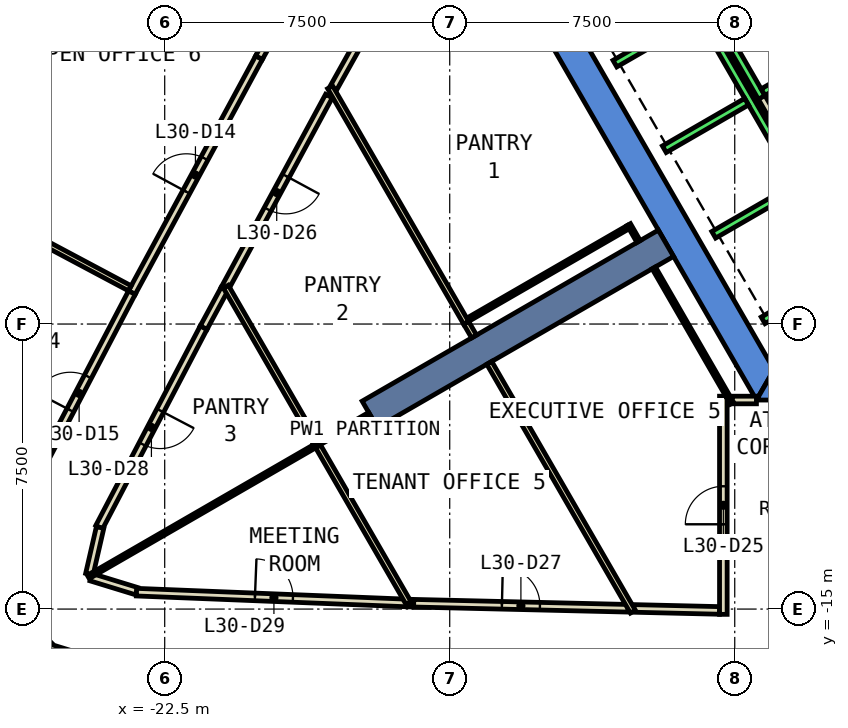
"""IFC4 building model, lengths in metres.
Left out: names, types, materials, properties, quantities, classifications, styles, units other than length and angle.
Written with IfcOpenShell. Run it as: python <this file> out.ifc"""

import sys

from ifc_helpers import new_model, si_unit, direction, frame, frame_2d, origin, place, context, subcontext, project, spatial, polyline, rectangle, outline, extrude, element, fill, save


model = new_model("IFC4")
c1 = context("Model", 3, precision=1e-05, world=origin(), true_north=direction((0.0, 1.0)))
c2 = subcontext(c1, "Body", "Model", "MODEL_VIEW")
j1 = project(units=[si_unit("LENGTHUNIT", "METRE"), si_unit("PLANEANGLEUNIT", "RADIAN")], contexts=[c1])
p1 = place(None, origin())
s1 = spatial("IfcSite", under=j1, at=p1, CompositionType="ELEMENT")
p2 = place(p1, origin())
s2 = spatial("IfcBuilding", under=s1, at=p2, CompositionType="ELEMENT")
p3 = place(p2, frame((0.0, 0.0, 138.2)))
s3 = spatial("IfcBuildingStorey", under=s2, at=p3, CompositionType="ELEMENT", Elevation=138.2)
p4 = place(p3, frame((0.0, 0.0, -0.6)))
e1 = element("IfcWall", 1, at=p4, inside=s3, PredefinedType="SHEAR", context=c2, shape_type="SweptSolid", body=[
    extrude(outline(polyline([(-13.856, 2.5), (-6.928, -9.5), (-6.466, -8.7), (-12.933, 2.5), (-13.856, 2.5)])), origin(), (0.0, 0.0, 1.0), 4.4),
])
p5 = place(p3, frame((0.0, 0.0, -0.6)))
e2 = element("IfcWall", 2, at=p5, inside=s3, PredefinedType="SHEAR", context=c2, shape_type="SweptSolid", body=[
    extrude(outline(polyline([(3.75, -9.5), (3.75, -8.7), (-6.466, -8.7), (-6.928, -9.5), (3.75, -9.5)])), origin(), (0.0, 0.0, 1.0), 4.4),
])
p6 = place(p3, frame((-9.31, -5.375, -0.6), z_axis=(0.0, 0.0, 1.0), x_axis=(-0.866017533419, -0.500013631625, 0.0)))
e3 = element("IfcWall", 3, at=p6, inside=s3, PredefinedType="SHEAR", context=c2, shape_type="SweptSolid", body=[
    extrude(rectangle(XDim=9.0, YDim=0.8, at=frame_2d((4.5, 0.0))), origin(), (0.0, 0.0, 1.0), 4.4),
])
p7 = place(p3, frame((-14.955, 4.264, 0.0), z_axis=(0.0, 0.0, 1.0), x_axis=(-0.4879770011, -0.872856486713, 0.0)))
e4 = element("IfcWall", 4, at=p7, inside=s3, PredefinedType="PARTITIONING", context=c2, shape_type="SweptSolid", body=[
    extrude(rectangle(XDim=6.363, YDim=0.2, at=frame_2d((3.182, 0.0))), origin(), (0.0, 0.0, 1.0), 3.8),
])
p8 = place(p7, frame((2.681, 0.0, 0.0)))
e5 = element("IfcOpeningElement", 5, at=p8, cuts=e4, PredefinedType="OPENING", context=c2, shape_type="SweptSolid", body=[
    extrude(rectangle(XDim=1.0, YDim=2.1, at=frame_2d((0.5, 1.05))), frame((0.0, 0.11, 0.0), z_axis=(0.0, -1.0, 0.0), x_axis=(1.0, 0.0, 0.0)), (0.0, 0.0, 1.0), 0.22),
])
p9 = place(p3, frame((-10.155, -14.983, 0.0), z_axis=(0.0, 0.0, 1.0), x_axis=(0.999724165956, -0.023485995887, 0.0)))
e6 = element("IfcWall", 6, at=p9, inside=s3, PredefinedType="PARTITIONING", context=c2, shape_type="SweptSolid", body=[
    extrude(rectangle(XDim=2.256, YDim=0.2, at=frame_2d((1.128, 0.0))), origin(), (0.0, 0.0, 1.0), 3.8),
])
p10 = place(p3, frame((-18.178, -1.501, 0.0), z_axis=(0.0, 0.0, 1.0), x_axis=(-0.475923642768, -0.879486603795, 0.0)))
e7 = element("IfcWall", 7, at=p10, inside=s3, PredefinedType="PARTITIONING", context=c2, shape_type="SweptSolid", body=[
    extrude(rectangle(XDim=5.776, YDim=0.2, at=frame_2d((2.888, 0.0))), origin(), (0.0, 0.0, 1.0), 3.8),
])
p11 = place(p10, frame((2.388, 0.0, 0.0)))
e8 = element("IfcOpeningElement", 8, at=p11, cuts=e7, PredefinedType="OPENING", context=c2, shape_type="SweptSolid", body=[
    extrude(rectangle(XDim=1.0, YDim=2.1, at=frame_2d((0.5, 1.05))), frame((0.0, 0.11, 0.0), z_axis=(0.0, -1.0, 0.0), x_axis=(1.0, 0.0, 0.0)), (0.0, 0.0, 1.0), 0.22),
])
p12 = place(p3, frame((-15.948, -14.846, 0.0), z_axis=(0.0, 0.0, 1.0), x_axis=(0.999722136341, -0.023572231734, 0.0)))
e9 = element("IfcWall", 9, at=p12, inside=s3, PredefinedType="PARTITIONING", context=c2, shape_type="SweptSolid", body=[
    extrude(rectangle(XDim=5.645, YDim=0.2, at=frame_2d((2.822, 0.0))), origin(), (0.0, 0.0, 1.0), 3.8),
])
p13 = place(p12, frame((2.322, 0.0, 0.0)))
e10 = element("IfcOpeningElement", 10, at=p13, cuts=e9, PredefinedType="OPENING", context=c2, shape_type="SweptSolid", body=[
    extrude(rectangle(XDim=1.0, YDim=2.1, at=frame_2d((0.5, 1.05))), frame((0.0, 0.11, 0.0), z_axis=(0.0, -1.0, 0.0), x_axis=(1.0, 0.0, 0.0)), (0.0, 0.0, 1.0), 0.22),
])
p14 = place(p3, frame((-21.475, -7.594, 0.0), z_axis=(0.0, 0.0, 1.0), x_axis=(-0.463809970306, -0.885934710599, 0.0)))
e11 = element("IfcWall", 11, at=p14, inside=s3, PredefinedType="PARTITIONING", context=c2, shape_type="SweptSolid", body=[
    extrude(rectangle(XDim=5.927, YDim=0.2, at=frame_2d((2.963, 0.0))), origin(), (0.0, 0.0, 1.0), 3.8),
])
p15 = place(p14, frame((2.464, 0.0, 0.0)))
e12 = element("IfcOpeningElement", 12, at=p15, cuts=e11, PredefinedType="OPENING", context=c2, shape_type="SweptSolid", body=[
    extrude(rectangle(XDim=1.0, YDim=2.1, at=frame_2d((0.5, 1.05))), frame((0.0, 0.11, 0.0), z_axis=(0.0, -1.0, 0.0), x_axis=(1.0, 0.0, 0.0)), (0.0, 0.0, 1.0), 0.22),
])
p16 = place(p3, frame((-24.2, -12.854, 0.0), z_axis=(0.0, 0.0, 1.0), x_axis=(-0.223967203961, -0.974596681479, 0.0)))
e13 = element("IfcWall", 13, at=p16, inside=s3, PredefinedType="PARTITIONING", context=c2, shape_type="SweptSolid", body=[
    extrude(rectangle(XDim=1.259, YDim=0.2, at=frame_2d((0.629, 0.0))), origin(), (0.0, 0.0, 1.0), 3.8),
])
p17 = place(p3, frame((-20.927, -6.581, 0.0), z_axis=(0.0, 0.0, 1.0), x_axis=(-0.475893856394, -0.879502721682, 0.0)))
e14 = element("IfcWall", 14, at=p17, inside=s3, PredefinedType="PARTITIONING", context=c2, shape_type="SweptSolid", body=[
    extrude(rectangle(XDim=1.152, YDim=0.2, at=frame_2d((0.576, 0.0))), origin(), (0.0, 0.0, 1.0), 3.8),
])
p18 = place(p3, frame((-24.435, -14.162, 0.0), z_axis=(0.0, 0.0, 1.0), x_axis=(0.956086269468, -0.293085389152, 0.0)))
e15 = element("IfcWall", 15, at=p18, inside=s3, PredefinedType="PARTITIONING", context=c2, shape_type="SweptSolid", body=[
    extrude(rectangle(XDim=1.252, YDim=0.2, at=frame_2d((0.626, 0.0))), origin(), (0.0, 0.0, 1.0), 3.8),
])
p19 = place(p3, frame((-23.242, -14.555, 0.0), z_axis=(0.0, 0.0, 1.0), x_axis=(0.999202143743, -0.039938401802, 0.0)))
e16 = element("IfcWall", 16, at=p19, inside=s3, PredefinedType="PARTITIONING", context=c2, shape_type="SweptSolid", body=[
    extrude(rectangle(XDim=7.238, YDim=0.2, at=frame_2d((3.619, 0.0))), origin(), (0.0, 0.0, 1.0), 3.8),
])
p20 = place(p19, frame((3.119, 0.0, 0.0)))
e17 = element("IfcOpeningElement", 17, at=p20, cuts=e16, PredefinedType="OPENING", context=c2, shape_type="SweptSolid", body=[
    extrude(rectangle(XDim=1.0, YDim=2.1, at=frame_2d((0.5, 1.05))), frame((0.0, 0.11, 0.0), z_axis=(0.0, -1.0, 0.0), x_axis=(1.0, 0.0, 0.0)), (0.0, 0.0, 1.0), 0.22),
])
p21 = place(p3, frame((-23.365, -6.673, 0.0), z_axis=(0.0, 0.0, 1.0), x_axis=(0.47597665142, 0.879457916732, 0.0)))
e18 = element("IfcWall", 18, at=p21, inside=s3, PredefinedType="PARTITIONING", context=c2, shape_type="SweptSolid", body=[
    extrude(rectangle(XDim=7.032, YDim=0.2, at=frame_2d((3.516, 0.0))), origin(), (0.0, 0.0, 1.0), 3.8),
])
p22 = place(p21, frame((3.016, 0.0, 0.0)))
e19 = element("IfcOpeningElement", 19, at=p22, cuts=e18, PredefinedType="OPENING", context=c2, shape_type="SweptSolid", body=[
    extrude(rectangle(XDim=1.0, YDim=2.1, at=frame_2d((0.5, 1.05))), frame((0.0, 0.11, 0.0), z_axis=(0.0, -1.0, 0.0), x_axis=(1.0, 0.0, 0.0)), (0.0, 0.0, 1.0), 0.22),
])
p23 = place(p3, frame((-20.018, -0.489, 0.0), z_axis=(0.0, 0.0, 1.0), x_axis=(0.48792588674, 0.872885060617, 0.0)))
e20 = element("IfcWall", 20, at=p23, inside=s3, PredefinedType="PARTITIONING", context=c2, shape_type="SweptSolid", body=[
    extrude(rectangle(XDim=3.403, YDim=0.2, at=frame_2d((1.701, 0.0))), origin(), (0.0, 0.0, 1.0), 3.8),
])
p24 = place(p3, frame((-26.21, -12.111, 0.0), z_axis=(0.0, 0.0, 1.0), x_axis=(0.46374980173, 0.885966207818, 0.0)))
e21 = element("IfcWall", 21, at=p24, inside=s3, PredefinedType="PARTITIONING", context=c2, shape_type="SweptSolid", body=[
    extrude(rectangle(XDim=6.137, YDim=0.2, at=frame_2d((3.068, 0.0))), origin(), (0.0, 0.0, 1.0), 3.8),
])
p25 = place(p24, frame((2.644, 0.0, 0.0)))
e22 = element("IfcOpeningElement", 22, at=p25, cuts=e21, PredefinedType="OPENING", context=c2, shape_type="SweptSolid", body=[
    extrude(rectangle(XDim=1.0, YDim=2.1, at=frame_2d((0.5, 1.05))), frame((0.0, 0.11, 0.0), z_axis=(0.0, -1.0, 0.0), x_axis=(1.0, 0.0, 0.0)), (0.0, 0.0, 1.0), 0.22),
])
p26 = place(p3, frame((-23.594, -16.617, 0.0), z_axis=(0.0, 0.0, 1.0), x_axis=(-0.955896815358, 0.293702704087, 0.0)))
e23 = element("IfcWall", 23, at=p26, inside=s3, PredefinedType="PARTITIONING", context=c2, shape_type="SweptSolid", body=[
    extrude(rectangle(XDim=2.06, YDim=0.2, at=frame_2d((1.03, 0.0))), origin(), (0.0, 0.0, 1.0), 3.8),
])
p27 = place(p3, frame((-5.492, -3.788, 0.0), z_axis=(0.0, 0.0, 1.0), x_axis=(-0.500008949224, 0.866020236886, 0.0)))
e24 = element("IfcWall", 24, at=p27, inside=s3, PredefinedType="PARTITIONING", context=c2, shape_type="SweptSolid", body=[
    extrude(rectangle(XDim=2.68, YDim=0.2, at=frame_2d((1.34, 0.0))), origin(), (0.0, 0.0, 1.0), 3.8),
])
p28 = place(p3, frame((-7.572, -9.499, 0.0), z_axis=(0.0, 0.0, 1.0), x_axis=(1.0, 0.0, 0.0)))
e25 = element("IfcWall", 25, at=p28, inside=s3, PredefinedType="PARTITIONING", context=c2, shape_type="SweptSolid", body=[
    extrude(rectangle(XDim=0.643, YDim=0.2, at=frame_2d((0.322, 0.0))), origin(), (0.0, 0.0, 1.0), 3.8),
])
p29 = place(p3, frame((-7.8, -15.139, 0.0), z_axis=(0.0, 0.0, 1.0), x_axis=(0.0, 1.0, 0.0)))
e26 = element("IfcWall", 26, at=p29, inside=s3, PredefinedType="PARTITIONING", context=c2, shape_type="SweptSolid", body=[
    extrude(rectangle(XDim=5.74, YDim=0.2, at=frame_2d((2.87, 0.0))), origin(), (0.0, 0.0, 1.0), 3.8),
])
p30 = place(p29, frame((2.37, 0.0, 0.0)))
e27 = element("IfcOpeningElement", 27, at=p30, cuts=e26, PredefinedType="OPENING", context=c2, shape_type="SweptSolid", body=[
    extrude(rectangle(XDim=1.0, YDim=2.1, at=frame_2d((0.5, 1.05))), frame((0.0, 0.11, 0.0), z_axis=(0.0, -1.0, 0.0), x_axis=(1.0, 0.0, 0.0)), (0.0, 0.0, 1.0), 0.22),
])
p31 = place(p3, frame((-7.572, -9.586, 0.0), z_axis=(0.0, 0.0, 1.0), x_axis=(-0.500037407586, 0.866003805427, 0.0)))
e28 = element("IfcWall", 28, at=p31, inside=s3, PredefinedType="PARTITIONING", context=c2, shape_type="SweptSolid", body=[
    extrude(rectangle(XDim=4.115, YDim=0.1, at=frame_2d((2.058, 0.0))), origin(), (0.0, 0.0, 1.0), 3.8),
])
p32 = place(p3, frame((-10.305, -4.951, 0.0), z_axis=(0.0, 0.0, 1.0), x_axis=(-0.866031185235, -0.4999899861, 0.0)))
e29 = element("IfcWall", 29, at=p32, inside=s3, PredefinedType="PARTITIONING", context=c2, shape_type="SweptSolid", body=[
    extrude(rectangle(XDim=4.95, YDim=0.1, at=frame_2d((2.475, 0.0))), origin(), (0.0, 0.0, 1.0), 3.8),
])
p33 = place(p3, frame((-14.567, -7.469, 0.0), z_axis=(0.0, 0.0, 1.0), x_axis=(-0.500056007527, 0.865993065409, 0.0)))
e30 = element("IfcWall", 30, at=p33, inside=s3, PredefinedType="PARTITIONING", context=c2, shape_type="SweptSolid", body=[
    extrude(rectangle(XDim=7.159, YDim=0.15, at=frame_2d((3.58, 0.0))), origin(), (0.0, 0.0, 1.0), 3.8),
])
p34 = place(p3, frame((-14.359, -7.828, 0.0), z_axis=(0.0, 0.0, 1.0), x_axis=(-0.501453821755, 0.865184410775, 0.0)))
e31 = element("IfcWall", 31, at=p34, inside=s3, PredefinedType="PARTITIONING", context=c2, shape_type="SweptSolid", body=[
    extrude(rectangle(XDim=0.415, YDim=0.15, at=frame_2d((0.208, 0.0))), origin(), (0.0, 0.0, 1.0), 3.8),
])
p35 = place(p3, frame((-10.18, -15.068, 0.0), z_axis=(0.0, 0.0, 1.0), x_axis=(-0.499907901386, 0.866078570415, 0.0)))
e32 = element("IfcWall", 32, at=p35, inside=s3, PredefinedType="PARTITIONING", context=c2, shape_type="SweptSolid", body=[
    extrude(rectangle(XDim=7.56, YDim=0.15, at=frame_2d((3.78, 0.0))), origin(), (0.0, 0.0, 1.0), 3.8),
])
p36 = place(p3, frame((-17.108, -9.869, 0.0), z_axis=(0.0, 0.0, 1.0), x_axis=(-0.866054481515, -0.499949632511, 0.0)))
e33 = element("IfcWall", 33, at=p36, inside=s3, PredefinedType="PARTITIONING", context=c2, shape_type="SweptSolid", body=[
    extrude(rectangle(XDim=1.675, YDim=0.1, at=frame_2d((0.837, 0.0))), origin(), (0.0, 0.0, 1.0), 3.8),
])
p37 = place(p3, frame((-18.518, -10.625, 0.0), z_axis=(0.0, 0.0, 1.0), x_axis=(-0.50001189137, 0.86601853819, 0.0)))
e34 = element("IfcWall", 34, at=p37, inside=s3, PredefinedType="PARTITIONING", context=c2, shape_type="SweptSolid", body=[
    extrude(rectangle(XDim=4.746, YDim=0.15, at=frame_2d((2.373, 0.0))), origin(), (0.0, 0.0, 1.0), 3.8),
])
p38 = place(p3, frame((-16.084, -14.841, 0.0), z_axis=(0.0, 0.0, 1.0), x_axis=(-0.50002451059, 0.866011252126, 0.0)))
e35 = element("IfcWall", 35, at=p38, inside=s3, PredefinedType="PARTITIONING", context=c2, shape_type="SweptSolid", body=[
    extrude(rectangle(XDim=4.758, YDim=0.15, at=frame_2d((2.379, 0.0))), origin(), (0.0, 0.0, 1.0), 3.8),
])
p39 = place(p3, frame((-18.553, -10.715, 0.0), z_axis=(0.0, 0.0, 1.0), x_axis=(-0.865984622623, -0.500070628392, 0.0)))
e36 = element("IfcWall", 36, at=p39, inside=s3, PredefinedType="PARTITIONING", context=c2, shape_type="SweptSolid", body=[
    extrude(rectangle(XDim=6.879, YDim=0.1, at=frame_2d((3.439, 0.0))), origin(), (0.0, 0.0, 1.0), 3.8),
])
p40 = place(p3, frame((-23.417, -6.56, 0.0), z_axis=(0.0, 0.0, 1.0), x_axis=(-0.882784638588, 0.469777906967, 0.0)))
e37 = element("IfcWall", 37, at=p40, inside=s3, PredefinedType="PARTITIONING", context=c2, shape_type="SweptSolid", body=[
    extrude(rectangle(XDim=5.13, YDim=0.15, at=frame_2d((2.565, 0.0))), origin(), (0.0, 0.0, 1.0), 3.8),
])
p41 = place(p3, frame((-10.03, -5.329, 0.0), z_axis=(0.0, 0.0, 1.0), x_axis=(-0.499352927503, 0.866398669086, 0.0)))
e38 = element("IfcWall", 38, at=p41, inside=s3, PredefinedType="PARTITIONING", context=c2, shape_type="SweptSolid", body=[
    extrude(rectangle(XDim=0.515, YDim=0.1, at=frame_2d((0.257, 0.0))), origin(), (0.0, 0.0, 1.0), 3.8),
])
p42 = place(p3, frame((-8.192, 0.888, 0.0), z_axis=(0.0, 0.0, 1.0), x_axis=(0.49994636267, -0.866056369097, 0.0)))
e39 = element("IfcWall", 39, at=p42, inside=s3, PredefinedType="STANDARD", context=c2, shape_type="SweptSolid", body=[
    extrude(rectangle(XDim=2.8, YDim=0.2, at=frame_2d((1.4, 0.0))), origin(), (0.0, 0.0, 1.0), 3.8),
])
p43 = place(p3, frame((-4.677, -0.2, 0.0), z_axis=(0.0, 0.0, 1.0), x_axis=(-0.865973769406, -0.500089422704, 0.0)))
e40 = element("IfcWall", 40, at=p43, inside=s3, PredefinedType="STANDARD", context=c2, shape_type="SweptSolid", body=[
    extrude(rectangle(XDim=2.399, YDim=0.2, at=frame_2d((1.2, 0.0))), origin(), (0.0, 0.0, 1.0), 3.8),
])
p44 = place(p3, frame((-9.751, 2.99, 0.0), z_axis=(0.0, 0.0, 1.0), x_axis=(0.50000090737, -0.866024879913, 0.0)))
e41 = element("IfcWall", 41, at=p44, inside=s3, PredefinedType="STANDARD", context=c2, shape_type="SweptSolid", body=[
    extrude(rectangle(XDim=10.6, YDim=0.2, at=frame_2d((5.3, 0.0))), origin(), (0.0, 0.0, 1.0), 3.8),
])
for number, where, z_axis, x_axis in (
    (42, (-8.488, 0.602, 0.0), (0.0, 0.0, 1.0), (-0.866, -0.5, 0.0)),
    (43, (-7.188, -1.65, 0.0), (0.0, 0.0, 1.0), (-0.866, -0.5, 0.0)),
    (44, (-5.888, -3.902, 0.0), (0.0, 0.0, 1.0), (-0.866, -0.5, 0.0)),
    (45, (-4.588, -6.153, 0.0), (0.0, 0.0, 1.0), (-0.866, -0.5, 0.0)),
):
    element("IfcWall", number, at=place(p3, frame(where, z_axis=z_axis, x_axis=x_axis)), inside=s3, PredefinedType="STANDARD", context=c2, shape_type="SweptSolid", body=[
        extrude(rectangle(XDim=2.5, YDim=0.2, at=frame_2d((1.25, 0.0))), origin(), (0.0, 0.0, 1.0), 3.8),
    ])
p45 = place(p22, origin())
e46 = element("IfcDoor", 46, at=p45, inside=s3, OperationType="SINGLE_SWING_LEFT", PredefinedType="DOOR", context=c2, shape_type="SweptSolid", body=[
    extrude(rectangle(XDim=1.0, YDim=2.1, at=frame_2d((0.5, 1.05))), frame((0.0, 0.025, 0.0), z_axis=(0.0, -1.0, 0.0), x_axis=(1.0, 0.0, 0.0)), (0.0, 0.0, 1.0), 0.05),
])
fill(e19, e46)
p46 = place(p25, origin())
e47 = element("IfcDoor", 47, at=p46, inside=s3, OperationType="SINGLE_SWING_LEFT", PredefinedType="DOOR", context=c2, shape_type="SweptSolid", body=[
    extrude(rectangle(XDim=1.0, YDim=2.1, at=frame_2d((0.5, 1.05))), frame((0.0, 0.025, 0.0), z_axis=(0.0, -1.0, 0.0), x_axis=(1.0, 0.0, 0.0)), (0.0, 0.0, 1.0), 0.05),
])
fill(e22, e47)
p47 = place(p30, origin())
e48 = element("IfcDoor", 48, at=p47, inside=s3, OperationType="SINGLE_SWING_LEFT", PredefinedType="DOOR", context=c2, shape_type="SweptSolid", body=[
    extrude(rectangle(XDim=1.0, YDim=2.1, at=frame_2d((0.5, 1.05))), frame((0.0, 0.025, 0.0), z_axis=(0.0, -1.0, 0.0), x_axis=(1.0, 0.0, 0.0)), (0.0, 0.0, 1.0), 0.05),
])
fill(e27, e48)
p48 = place(p11, origin())
e49 = element("IfcDoor", 49, at=p48, inside=s3, OperationType="SINGLE_SWING_LEFT", PredefinedType="DOOR", context=c2, shape_type="SweptSolid", body=[
    extrude(rectangle(XDim=1.0, YDim=2.1, at=frame_2d((0.5, 1.05))), frame((0.0, 0.025, 0.0), z_axis=(0.0, -1.0, 0.0), x_axis=(1.0, 0.0, 0.0)), (0.0, 0.0, 1.0), 0.05),
])
fill(e8, e49)
p49 = place(p13, origin())
e50 = element("IfcDoor", 50, at=p49, inside=s3, OperationType="SINGLE_SWING_LEFT", PredefinedType="DOOR", context=c2, shape_type="SweptSolid", body=[
    extrude(rectangle(XDim=1.0, YDim=2.1, at=frame_2d((0.5, 1.05))), frame((0.0, 0.025, 0.0), z_axis=(0.0, -1.0, 0.0), x_axis=(1.0, 0.0, 0.0)), (0.0, 0.0, 1.0), 0.05),
])
fill(e10, e50)
p50 = place(p15, origin())
e51 = element("IfcDoor", 51, at=p50, inside=s3, OperationType="SINGLE_SWING_LEFT", PredefinedType="DOOR", context=c2, shape_type="SweptSolid", body=[
    extrude(rectangle(XDim=1.0, YDim=2.1, at=frame_2d((0.5, 1.05))), frame((0.0, 0.025, 0.0), z_axis=(0.0, -1.0, 0.0), x_axis=(1.0, 0.0, 0.0)), (0.0, 0.0, 1.0), 0.05),
])
fill(e12, e51)
p51 = place(p20, origin())
e52 = element("IfcDoor", 52, at=p51, inside=s3, OperationType="SINGLE_SWING_LEFT", PredefinedType="DOOR", context=c2, shape_type="SweptSolid", body=[
    extrude(rectangle(XDim=1.0, YDim=2.1, at=frame_2d((0.5, 1.05))), frame((0.0, 0.025, 0.0), z_axis=(0.0, -1.0, 0.0), x_axis=(1.0, 0.0, 0.0)), (0.0, 0.0, 1.0), 0.05),
])
fill(e17, e52)
save(model, sys.argv[1])
